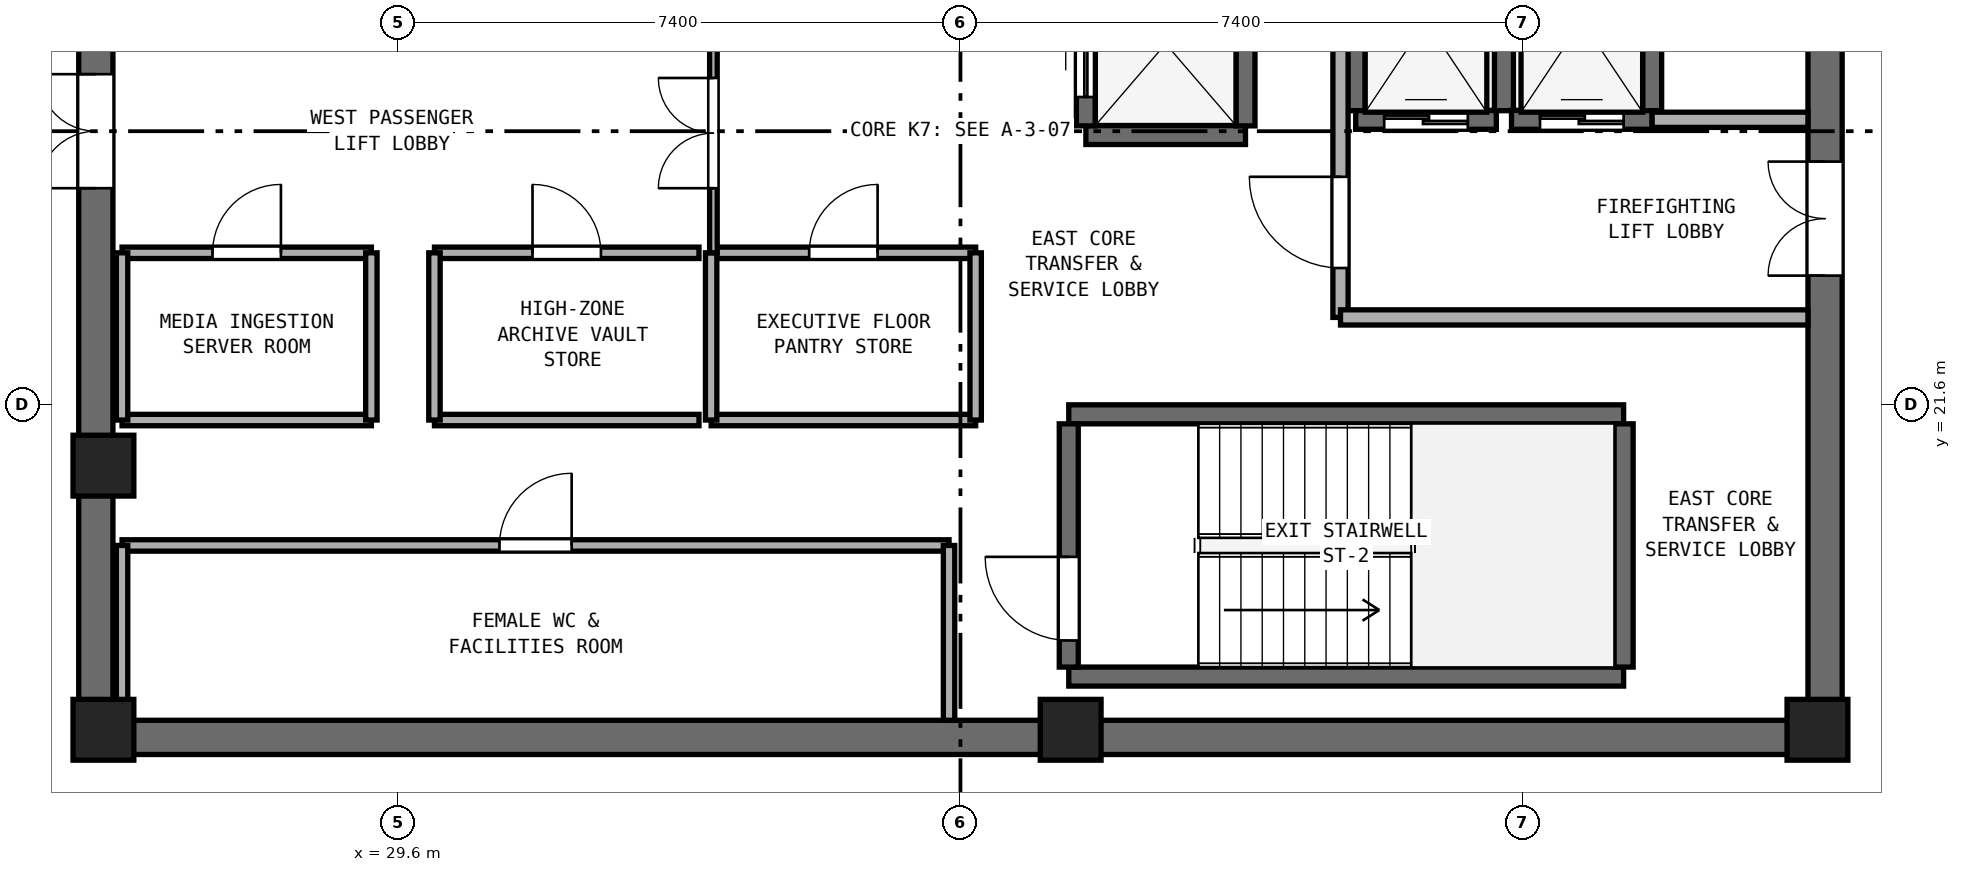
"""IFC4 building model, lengths in metres.
Left out: names, types, materials, properties, quantities, classifications, styles, units other than length and angle.
Written with IfcOpenShell. Run it as: python <this file> out.ifc"""

import sys

from ifc_helpers import new_model, si_unit, direction, frame, frame_2d, origin, origin_2d, place, context, subcontext, project, spatial, rectangle, extrude, element, fill, save


model = new_model("IFC4")
c1 = context("Model", 3, precision=1e-05, world=origin(), true_north=direction((0.0, 1.0)))
c2 = subcontext(c1, "Body", "Model", "MODEL_VIEW")
j1 = project(units=[si_unit("LENGTHUNIT", "METRE"), si_unit("PLANEANGLEUNIT", "RADIAN")], contexts=[c1])
p1 = place(None, origin())
s1 = spatial("IfcSite", under=j1, at=p1, CompositionType="ELEMENT")
p2 = place(p1, origin())
s2 = spatial("IfcBuilding", under=s1, at=p2, CompositionType="ELEMENT")
p3 = place(p2, frame((0.0, 0.0, 244.0)))
s3 = spatial("IfcBuildingStorey", under=s2, at=p3, CompositionType="ELEMENT", Elevation=244.0)
p4 = place(p3, frame((25.4, 17.225, 0.0), z_axis=(0.0, 0.0, 1.0), x_axis=(1.0, 0.0, 0.0)))
e1 = element("IfcWall", 1, at=p4, inside=s3, PredefinedType="SHEAR", context=c2, shape_type="SweptSolid", body=[
    extrude(rectangle(XDim=23.2, YDim=0.45, at=frame_2d((11.6, 0.0))), origin(), (0.0, 0.0, 1.0), 3.51),
])
p5 = place(p3, frame((25.625, 17.45, 0.0), z_axis=(0.0, 0.0, 1.0), x_axis=(0.0, 1.0, 0.0)))
e2 = element("IfcWall", 2, at=p5, inside=s3, PredefinedType="SHEAR", context=c2, shape_type="SweptSolid", body=[
    extrude(rectangle(XDim=15.5, YDim=0.45, at=frame_2d((7.75, 0.0))), origin(), (0.0, 0.0, 1.0), 3.51),
])
p6 = place(p5, frame((7.0, 0.0, 0.0)))
e3 = element("IfcOpeningElement", 3, at=p6, cuts=e2, PredefinedType="OPENING", context=c2, shape_type="SweptSolid", body=[
    extrude(rectangle(XDim=1.5, YDim=2.15, at=frame_2d((0.75, 1.075))), frame((0.0, 0.235, 0.0), z_axis=(0.0, -1.0, 0.0), x_axis=(1.0, 0.0, 0.0)), (0.0, 0.0, 1.0), 0.47),
])
p7 = place(p3, frame((48.375, 17.45, 0.0), z_axis=(0.0, 0.0, 1.0), x_axis=(0.0, 1.0, 0.0)))
e4 = element("IfcWall", 4, at=p7, inside=s3, PredefinedType="SHEAR", context=c2, shape_type="SweptSolid", body=[
    extrude(rectangle(XDim=15.5, YDim=0.45, at=frame_2d((7.75, 0.0))), origin(), (0.0, 0.0, 1.0), 3.51),
])
p8 = place(p7, frame((5.85, 0.0, 0.0)))
e5 = element("IfcOpeningElement", 5, at=p8, cuts=e4, PredefinedType="OPENING", context=c2, shape_type="SweptSolid", body=[
    extrude(rectangle(XDim=1.5, YDim=2.15, at=frame_2d((0.75, 1.075))), frame((0.0, 0.235, 0.0), z_axis=(0.0, -1.0, 0.0), x_axis=(1.0, 0.0, 0.0)), (0.0, 0.0, 1.0), 0.47),
])
for number, where, z_axis, x_axis in (
    (6, (25.725, 17.325, 0.0), (0.0, 0.0, 1.0), (1.0, 0.0, 0.0)),
    (7, (38.45, 17.325, 0.0), (0.0, 0.0, 1.0), (1.0, 0.0, 0.0)),
    (8, (48.275, 17.325, 0.0), (0.0, 0.0, 1.0), (1.0, 0.0, 0.0)),
    (9, (25.725, 20.8, 0.0), (0.0, 0.0, 1.0), (1.0, 0.0, 0.0)),
):
    element("IfcColumn", number, at=place(p3, frame(where, z_axis=z_axis, x_axis=x_axis)), inside=s3, PredefinedType="PILASTER", context=c2, shape_type="SweptSolid", body=[
        extrude(rectangle(XDim=0.8, YDim=0.8, at=origin_2d()), origin(), (0.0, 0.0, 1.0), 3.8),
    ])
for number, where, z_axis, x_axis in (
    (10, (38.425, 18.025, 0.0), (0.0, 0.0, 1.0), (1.0, 0.0, 0.0)),
    (11, (38.425, 21.475, 0.0), (0.0, 0.0, 1.0), (1.0, 0.0, 0.0)),
):
    element("IfcWall", number, at=place(p3, frame(where, z_axis=z_axis, x_axis=x_axis)), inside=s3, PredefinedType="SHEAR", context=c2, shape_type="SweptSolid", body=[
        extrude(rectangle(XDim=7.3, YDim=0.25, at=frame_2d((3.65, 0.0))), origin(), (0.0, 0.0, 1.0), 3.51),
    ])
p9 = place(p3, frame((38.425, 18.15, 0.0), z_axis=(0.0, 0.0, 1.0), x_axis=(0.0, 1.0, 0.0)))
e12 = element("IfcWall", 12, at=p9, inside=s3, PredefinedType="SHEAR", context=c2, shape_type="SweptSolid", body=[
    extrude(rectangle(XDim=3.2, YDim=0.25, at=frame_2d((1.6, 0.0))), origin(), (0.0, 0.0, 1.0), 3.51),
])
p10 = place(p9, frame((0.35, 0.0, 0.0)))
e13 = element("IfcOpeningElement", 13, at=p10, cuts=e12, PredefinedType="OPENING", context=c2, shape_type="SweptSolid", body=[
    extrude(rectangle(XDim=1.1, YDim=2.15, at=frame_2d((0.55, 1.075))), frame((0.0, 0.135, 0.0), z_axis=(0.0, -1.0, 0.0), x_axis=(1.0, 0.0, 0.0)), (0.0, 0.0, 1.0), 0.27),
])
p11 = place(p3, frame((45.725, 18.15, 0.0), z_axis=(0.0, 0.0, 1.0), x_axis=(0.0, 1.0, 0.0)))
e14 = element("IfcWall", 14, at=p11, inside=s3, PredefinedType="SHEAR", context=c2, shape_type="SweptSolid", body=[
    extrude(rectangle(XDim=3.2, YDim=0.25, at=frame_2d((1.6, 0.0))), origin(), (0.0, 0.0, 1.0), 3.51),
])
p12 = place(p3, frame((42.2, 25.35, 0.0), z_axis=(0.0, 0.0, 1.0), x_axis=(1.0, 0.0, 0.0)))
e15 = element("IfcWall", 15, at=p12, inside=s3, PredefinedType="SHEAR", context=c2, shape_type="SweptSolid", body=[
    extrude(rectangle(XDim=1.85, YDim=0.25, at=frame_2d((0.925, 0.0))), origin(), (0.0, 0.0, 1.0), 3.51),
])
p13 = place(p12, frame((0.375, 0.0, 0.0)))
e16 = element("IfcOpeningElement", 16, at=p13, cuts=e15, PredefinedType="OPENING", context=c2, shape_type="SweptSolid", body=[
    extrude(rectangle(XDim=1.1, YDim=2.15, at=frame_2d((0.55, 1.075))), frame((0.0, 0.135, 0.0), z_axis=(0.0, -1.0, 0.0), x_axis=(1.0, 0.0, 0.0)), (0.0, 0.0, 1.0), 0.27),
])
for number, where, z_axis, x_axis in (
    (17, (42.2, 25.47, 0.0), (0.0, 0.0, 1.0), (0.0, 1.0, 0.0)),
    (18, (44.15, 25.47, 0.0), (0.0, 0.0, 1.0), (0.0, 1.0, 0.0)),
):
    element("IfcWall", number, at=place(p3, frame(where, z_axis=z_axis, x_axis=x_axis)), inside=s3, PredefinedType="SHEAR", context=c2, shape_type="SweptSolid", body=[
        extrude(rectangle(XDim=2.36, YDim=0.25, at=frame_2d((1.18, 0.0))), origin(), (0.0, 0.0, 1.0), 3.51),
    ])
p14 = place(p3, frame((44.25, 25.35, 0.0), z_axis=(0.0, 0.0, 1.0), x_axis=(1.0, 0.0, 0.0)))
e19 = element("IfcWall", 19, at=p14, inside=s3, PredefinedType="SHEAR", context=c2, shape_type="SweptSolid", body=[
    extrude(rectangle(XDim=1.85, YDim=0.25, at=frame_2d((0.925, 0.0))), origin(), (0.0, 0.0, 1.0), 3.51),
])
p15 = place(p14, frame((0.375, 0.0, 0.0)))
e20 = element("IfcOpeningElement", 20, at=p15, cuts=e19, PredefinedType="OPENING", context=c2, shape_type="SweptSolid", body=[
    extrude(rectangle(XDim=1.1, YDim=2.15, at=frame_2d((0.55, 1.075))), frame((0.0, 0.135, 0.0), z_axis=(0.0, -1.0, 0.0), x_axis=(1.0, 0.0, 0.0)), (0.0, 0.0, 1.0), 0.27),
])
p16 = place(p3, frame((46.1, 25.47, 0.0), z_axis=(0.0, 0.0, 1.0), x_axis=(0.0, 1.0, 0.0)))
e21 = element("IfcWall", 21, at=p16, inside=s3, PredefinedType="SHEAR", context=c2, shape_type="SweptSolid", body=[
    extrude(rectangle(XDim=2.36, YDim=0.25, at=frame_2d((1.18, 0.0))), origin(), (0.0, 0.0, 1.0), 3.51),
])
p17 = place(p3, frame((38.65, 25.15, 0.0), z_axis=(0.0, 0.0, 1.0), x_axis=(1.0, 0.0, 0.0)))
e22 = element("IfcWall", 22, at=p17, inside=s3, PredefinedType="SHEAR", context=c2, shape_type="SweptSolid", body=[
    extrude(rectangle(XDim=2.1, YDim=0.25, at=frame_2d((1.05, 0.0))), origin(), (0.0, 0.0, 1.0), 3.51),
])
p18 = place(p3, frame((38.65, 25.27, 0.0), z_axis=(0.0, 0.0, 1.0), x_axis=(0.0, 1.0, 0.0)))
e23 = element("IfcWall", 23, at=p18, inside=s3, PredefinedType="SHEAR", context=c2, shape_type="SweptSolid", body=[
    extrude(rectangle(XDim=2.16, YDim=0.25, at=frame_2d((1.08, 0.0))), origin(), (0.0, 0.0, 1.0), 3.51),
])
p19 = place(p18, frame((0.38, 0.0, 0.0)))
e24 = element("IfcOpeningElement", 24, at=p19, cuts=e23, PredefinedType="OPENING", context=c2, shape_type="SweptSolid", body=[
    extrude(rectangle(XDim=1.4, YDim=2.2, at=frame_2d((0.7, 1.1))), frame((0.0, 0.135, 0.0), z_axis=(0.0, -1.0, 0.0), x_axis=(1.0, 0.0, 0.0)), (0.0, 0.0, 1.0), 0.27),
])
p20 = place(p3, frame((40.75, 25.27, 0.0), z_axis=(0.0, 0.0, 1.0), x_axis=(0.0, 1.0, 0.0)))
e25 = element("IfcWall", 25, at=p20, inside=s3, PredefinedType="SHEAR", context=c2, shape_type="SweptSolid", body=[
    extrude(rectangle(XDim=2.16, YDim=0.25, at=frame_2d((1.08, 0.0))), origin(), (0.0, 0.0, 1.0), 3.51),
])
p21 = place(p3, frame((42.0, 22.75, 0.0), z_axis=(0.0, 0.0, 1.0), x_axis=(0.0, 1.0, 0.0)))
e26 = element("IfcWall", 26, at=p21, inside=s3, PredefinedType="SOLIDWALL", context=c2, shape_type="SweptSolid", body=[
    extrude(rectangle(XDim=6.05, YDim=0.2, at=frame_2d((3.025, 0.0))), origin(), (0.0, 0.0, 1.0), 3.51),
])
p22 = place(p21, frame((0.65, 0.0, 0.0)))
e27 = element("IfcOpeningElement", 27, at=p22, cuts=e26, PredefinedType="OPENING", context=c2, shape_type="SweptSolid", body=[
    extrude(rectangle(XDim=1.2, YDim=2.15, at=frame_2d((0.6, 1.075))), frame((0.0, 0.11, 0.0), z_axis=(0.0, -1.0, 0.0), x_axis=(1.0, 0.0, 0.0)), (0.0, 0.0, 1.0), 0.22),
])
p23 = place(p3, frame((42.0, 22.75, 0.0), z_axis=(0.0, 0.0, 1.0), x_axis=(1.0, 0.0, 0.0)))
e28 = element("IfcWall", 28, at=p23, inside=s3, PredefinedType="SOLIDWALL", context=c2, shape_type="SweptSolid", body=[
    extrude(rectangle(XDim=6.15, YDim=0.2, at=frame_2d((3.075, 0.0))), origin(), (0.0, 0.0, 1.0), 3.51),
])
p24 = place(p3, frame((46.1, 25.35, 0.0), z_axis=(0.0, 0.0, 1.0), x_axis=(1.0, 0.0, 0.0)))
e29 = element("IfcWall", 29, at=p24, inside=s3, PredefinedType="SOLIDWALL", context=c2, shape_type="SweptSolid", body=[
    extrude(rectangle(XDim=2.05, YDim=0.2, at=frame_2d((1.025, 0.0))), origin(), (0.0, 0.0, 1.0), 3.51),
])
p25 = place(p3, frame((25.97, 19.75, 0.0), z_axis=(0.0, 0.0, 1.0), x_axis=(1.0, 0.0, 0.0)))
e30 = element("IfcWall", 30, at=p25, inside=s3, PredefinedType="PARTITIONING", context=c2, shape_type="SweptSolid", body=[
    extrude(rectangle(XDim=10.88, YDim=0.15, at=frame_2d((5.44, 0.0))), origin(), (0.0, 0.0, 1.0), 3.51),
])
p26 = place(p25, frame((4.965, 0.0, 0.0)))
e31 = element("IfcOpeningElement", 31, at=p26, cuts=e30, PredefinedType="OPENING", context=c2, shape_type="SweptSolid", body=[
    extrude(rectangle(XDim=0.95, YDim=2.1, at=frame_2d((0.475, 1.05))), frame((0.0, 0.085, 0.0), z_axis=(0.0, -1.0, 0.0), x_axis=(1.0, 0.0, 0.0)), (0.0, 0.0, 1.0), 0.17),
])
p27 = place(p3, frame((25.97, 17.45, 0.0), z_axis=(0.0, 0.0, 1.0), x_axis=(0.0, 1.0, 0.0)))
e32 = element("IfcWall", 32, at=p27, inside=s3, PredefinedType="PARTITIONING", context=c2, shape_type="SweptSolid", body=[
    extrude(rectangle(XDim=2.3, YDim=0.15, at=frame_2d((1.15, 0.0))), origin(), (0.0, 0.0, 1.0), 2.61),
])
p28 = place(p3, frame((36.85, 17.45, 0.0), z_axis=(0.0, 0.0, 1.0), x_axis=(0.0, 1.0, 0.0)))
e33 = element("IfcWall", 33, at=p28, inside=s3, PredefinedType="PARTITIONING", context=c2, shape_type="SweptSolid", body=[
    extrude(rectangle(XDim=2.3, YDim=0.15, at=frame_2d((1.15, 0.0))), origin(), (0.0, 0.0, 1.0), 3.51),
])
p29 = place(p3, frame((25.97, 21.4, 0.0), z_axis=(0.0, 0.0, 1.0), x_axis=(1.0, 0.0, 0.0)))
e34 = element("IfcWall", 34, at=p29, inside=s3, PredefinedType="PARTITIONING", context=c2, shape_type="SweptSolid", body=[
    extrude(rectangle(XDim=3.28, YDim=0.15, at=frame_2d((1.64, 0.0))), origin(), (0.0, 0.0, 1.0), 3.51),
])
p30 = place(p3, frame((25.97, 23.6, 0.0), z_axis=(0.0, 0.0, 1.0), x_axis=(1.0, 0.0, 0.0)))
e35 = element("IfcWall", 35, at=p30, inside=s3, PredefinedType="PARTITIONING", context=c2, shape_type="SweptSolid", body=[
    extrude(rectangle(XDim=3.28, YDim=0.15, at=frame_2d((1.64, 0.0))), origin(), (0.0, 0.0, 1.0), 3.51),
])
p31 = place(p30, frame((1.19, 0.0, 0.0)))
e36 = element("IfcOpeningElement", 36, at=p31, cuts=e35, PredefinedType="OPENING", context=c2, shape_type="SweptSolid", body=[
    extrude(rectangle(XDim=0.9, YDim=2.1, at=frame_2d((0.45, 1.05))), frame((0.0, 0.085, 0.0), z_axis=(0.0, -1.0, 0.0), x_axis=(1.0, 0.0, 0.0)), (0.0, 0.0, 1.0), 0.17),
])
p32 = place(p3, frame((25.97, 21.4, 0.0), z_axis=(0.0, 0.0, 1.0), x_axis=(0.0, 1.0, 0.0)))
e37 = element("IfcWall", 37, at=p32, inside=s3, PredefinedType="PARTITIONING", context=c2, shape_type="SweptSolid", body=[
    extrude(rectangle(XDim=2.2, YDim=0.15, at=frame_2d((1.1, 0.0))), origin(), (0.0, 0.0, 1.0), 2.61),
])
p33 = place(p3, frame((29.25, 21.4, 0.0), z_axis=(0.0, 0.0, 1.0), x_axis=(0.0, 1.0, 0.0)))
e38 = element("IfcWall", 38, at=p33, inside=s3, PredefinedType="PARTITIONING", context=c2, shape_type="SweptSolid", body=[
    extrude(rectangle(XDim=2.2, YDim=0.15, at=frame_2d((1.1, 0.0))), origin(), (0.0, 0.0, 1.0), 3.51),
])
p34 = place(p3, frame((30.08, 21.4, 0.0), z_axis=(0.0, 0.0, 1.0), x_axis=(1.0, 0.0, 0.0)))
e39 = element("IfcWall", 39, at=p34, inside=s3, PredefinedType="PARTITIONING", context=c2, shape_type="SweptSolid", body=[
    extrude(rectangle(XDim=3.48, YDim=0.15, at=frame_2d((1.74, 0.0))), origin(), (0.0, 0.0, 1.0), 3.51),
])
p35 = place(p3, frame((30.08, 23.6, 0.0), z_axis=(0.0, 0.0, 1.0), x_axis=(1.0, 0.0, 0.0)))
e40 = element("IfcWall", 40, at=p35, inside=s3, PredefinedType="PARTITIONING", context=c2, shape_type="SweptSolid", body=[
    extrude(rectangle(XDim=3.48, YDim=0.15, at=frame_2d((1.74, 0.0))), origin(), (0.0, 0.0, 1.0), 3.51),
])
p36 = place(p35, frame((1.29, 0.0, 0.0)))
e41 = element("IfcOpeningElement", 41, at=p36, cuts=e40, PredefinedType="OPENING", context=c2, shape_type="SweptSolid", body=[
    extrude(rectangle(XDim=0.9, YDim=2.1, at=frame_2d((0.45, 1.05))), frame((0.0, 0.085, 0.0), z_axis=(0.0, -1.0, 0.0), x_axis=(1.0, 0.0, 0.0)), (0.0, 0.0, 1.0), 0.17),
])
p37 = place(p3, frame((30.08, 21.4, 0.0), z_axis=(0.0, 0.0, 1.0), x_axis=(0.0, 1.0, 0.0)))
e42 = element("IfcWall", 42, at=p37, inside=s3, PredefinedType="PARTITIONING", context=c2, shape_type="SweptSolid", body=[
    extrude(rectangle(XDim=2.2, YDim=0.15, at=frame_2d((1.1, 0.0))), origin(), (0.0, 0.0, 1.0), 3.51),
])
p38 = place(p3, frame((33.72, 21.4, 0.0), z_axis=(0.0, 0.0, 1.0), x_axis=(1.0, 0.0, 0.0)))
e43 = element("IfcWall", 43, at=p38, inside=s3, PredefinedType="PARTITIONING", context=c2, shape_type="SweptSolid", body=[
    extrude(rectangle(XDim=3.48, YDim=0.15, at=frame_2d((1.74, 0.0))), origin(), (0.0, 0.0, 1.0), 3.51),
])
p39 = place(p3, frame((33.72, 23.6, 0.0), z_axis=(0.0, 0.0, 1.0), x_axis=(1.0, 0.0, 0.0)))
e44 = element("IfcWall", 44, at=p39, inside=s3, PredefinedType="PARTITIONING", context=c2, shape_type="SweptSolid", body=[
    extrude(rectangle(XDim=3.48, YDim=0.15, at=frame_2d((1.74, 0.0))), origin(), (0.0, 0.0, 1.0), 3.51),
])
p40 = place(p39, frame((1.29, 0.0, 0.0)))
e45 = element("IfcOpeningElement", 45, at=p40, cuts=e44, PredefinedType="OPENING", context=c2, shape_type="SweptSolid", body=[
    extrude(rectangle(XDim=0.9, YDim=2.1, at=frame_2d((0.45, 1.05))), frame((0.0, 0.085, 0.0), z_axis=(0.0, -1.0, 0.0), x_axis=(1.0, 0.0, 0.0)), (0.0, 0.0, 1.0), 0.17),
])
for number, where, z_axis, x_axis in (
    (46, (33.72, 21.4, 0.0), (0.0, 0.0, 1.0), (0.0, 1.0, 0.0)),
    (47, (37.2, 21.4, 0.0), (0.0, 0.0, 1.0), (0.0, 1.0, 0.0)),
):
    element("IfcWall", number, at=place(p3, frame(where, z_axis=z_axis, x_axis=x_axis)), inside=s3, PredefinedType="PARTITIONING", context=c2, shape_type="SweptSolid", body=[
        extrude(rectangle(XDim=2.2, YDim=0.15, at=frame_2d((1.1, 0.0))), origin(), (0.0, 0.0, 1.0), 3.51),
    ])
p41 = place(p3, frame((33.75, 23.6, 0.0), z_axis=(0.0, 0.0, 1.0), x_axis=(0.0, 1.0, 0.0)))
e48 = element("IfcWall", 48, at=p41, inside=s3, PredefinedType="PARTITIONING", context=c2, shape_type="SweptSolid", body=[
    extrude(rectangle(XDim=3.2, YDim=0.1, at=frame_2d((1.6, 0.0))), origin(), (0.0, 0.0, 1.0), 3.51),
])
p42 = place(p41, frame((0.85, 0.0, 0.0)))
e49 = element("IfcOpeningElement", 49, at=p42, cuts=e48, PredefinedType="OPENING", context=c2, shape_type="SweptSolid", body=[
    extrude(rectangle(XDim=1.45, YDim=2.12, at=frame_2d((0.725, 1.06))), frame((0.0, 0.06, 0.0), z_axis=(0.0, -1.0, 0.0), x_axis=(1.0, 0.0, 0.0)), (0.0, 0.0, 1.0), 0.12),
])
p43 = place(p10, origin())
e50 = element("IfcDoor", 50, at=p43, inside=s3, OperationType="SINGLE_SWING_RIGHT", PredefinedType="DOOR", context=c2, shape_type="SweptSolid", body=[
    extrude(rectangle(XDim=1.1, YDim=2.15, at=frame_2d((0.55, 1.075))), frame((0.0, 0.025, 0.0), z_axis=(0.0, -1.0, 0.0), x_axis=(1.0, 0.0, 0.0)), (0.0, 0.0, 1.0), 0.05),
])
fill(e13, e50)
p44 = place(p13, origin())
e51 = element("IfcDoor", 51, at=p44, inside=s3, OperationType="DOUBLE_DOOR_SLIDING", PredefinedType="DOOR", context=c2, shape_type="SweptSolid", body=[
    extrude(rectangle(XDim=1.1, YDim=2.15, at=frame_2d((0.55, 1.075))), frame((0.0, 0.025, 0.0), z_axis=(0.0, -1.0, 0.0), x_axis=(1.0, 0.0, 0.0)), (0.0, 0.0, 1.0), 0.05),
])
fill(e16, e51)
p45 = place(p15, origin())
e52 = element("IfcDoor", 52, at=p45, inside=s3, OperationType="DOUBLE_DOOR_SLIDING", PredefinedType="DOOR", context=c2, shape_type="SweptSolid", body=[
    extrude(rectangle(XDim=1.1, YDim=2.15, at=frame_2d((0.55, 1.075))), frame((0.0, 0.025, 0.0), z_axis=(0.0, -1.0, 0.0), x_axis=(1.0, 0.0, 0.0)), (0.0, 0.0, 1.0), 0.05),
])
fill(e20, e52)
p46 = place(p19, origin())
e53 = element("IfcDoor", 53, at=p46, inside=s3, OperationType="DOUBLE_DOOR_SLIDING", PredefinedType="DOOR", context=c2, shape_type="SweptSolid", body=[
    extrude(rectangle(XDim=1.4, YDim=2.2, at=frame_2d((0.7, 1.1))), frame((0.0, 0.025, 0.0), z_axis=(0.0, -1.0, 0.0), x_axis=(1.0, 0.0, 0.0)), (0.0, 0.0, 1.0), 0.05),
])
fill(e24, e53)
p47 = place(p22, origin())
e54 = element("IfcDoor", 54, at=p47, inside=s3, OperationType="SINGLE_SWING_RIGHT", PredefinedType="DOOR", context=c2, shape_type="SweptSolid", body=[
    extrude(rectangle(XDim=1.2, YDim=2.15, at=frame_2d((0.6, 1.075))), frame((0.0, 0.025, 0.0), z_axis=(0.0, -1.0, 0.0), x_axis=(1.0, 0.0, 0.0)), (0.0, 0.0, 1.0), 0.05),
])
fill(e27, e54)
p48 = place(p6, origin())
e55 = element("IfcDoor", 55, at=p48, inside=s3, OperationType="DOUBLE_DOOR_SINGLE_SWING", PredefinedType="DOOR", context=c2, shape_type="SweptSolid", body=[
    extrude(rectangle(XDim=1.5, YDim=2.15, at=frame_2d((0.75, 1.075))), frame((0.0, 0.025, 0.0), z_axis=(0.0, -1.0, 0.0), x_axis=(1.0, 0.0, 0.0)), (0.0, 0.0, 1.0), 0.05),
])
fill(e3, e55)
p49 = place(p8, origin())
e56 = element("IfcDoor", 56, at=p49, inside=s3, OperationType="DOUBLE_DOOR_SINGLE_SWING", PredefinedType="DOOR", context=c2, shape_type="SweptSolid", body=[
    extrude(rectangle(XDim=1.5, YDim=2.15, at=frame_2d((0.75, 1.075))), frame((0.0, 0.025, 0.0), z_axis=(0.0, -1.0, 0.0), x_axis=(1.0, 0.0, 0.0)), (0.0, 0.0, 1.0), 0.05),
])
fill(e5, e56)
p50 = place(p26, origin())
e57 = element("IfcDoor", 57, at=p50, inside=s3, OperationType="SINGLE_SWING_RIGHT", PredefinedType="DOOR", context=c2, shape_type="SweptSolid", body=[
    extrude(rectangle(XDim=0.95, YDim=2.1, at=frame_2d((0.475, 1.05))), frame((0.0, 0.025, 0.0), z_axis=(0.0, -1.0, 0.0), x_axis=(1.0, 0.0, 0.0)), (0.0, 0.0, 1.0), 0.05),
])
fill(e31, e57)
p51 = place(p31, origin())
e58 = element("IfcDoor", 58, at=p51, inside=s3, OperationType="SINGLE_SWING_RIGHT", PredefinedType="DOOR", context=c2, shape_type="SweptSolid", body=[
    extrude(rectangle(XDim=0.9, YDim=2.1, at=frame_2d((0.45, 1.05))), frame((0.0, 0.025, 0.0), z_axis=(0.0, -1.0, 0.0), x_axis=(1.0, 0.0, 0.0)), (0.0, 0.0, 1.0), 0.05),
])
fill(e36, e58)
p52 = place(p36, origin())
e59 = element("IfcDoor", 59, at=p52, inside=s3, OperationType="SINGLE_SWING_LEFT", PredefinedType="DOOR", context=c2, shape_type="SweptSolid", body=[
    extrude(rectangle(XDim=0.9, YDim=2.1, at=frame_2d((0.45, 1.05))), frame((0.0, 0.025, 0.0), z_axis=(0.0, -1.0, 0.0), x_axis=(1.0, 0.0, 0.0)), (0.0, 0.0, 1.0), 0.05),
])
fill(e41, e59)
p53 = place(p40, origin())
e60 = element("IfcDoor", 60, at=p53, inside=s3, OperationType="SINGLE_SWING_RIGHT", PredefinedType="DOOR", context=c2, shape_type="SweptSolid", body=[
    extrude(rectangle(XDim=0.9, YDim=2.1, at=frame_2d((0.45, 1.05))), frame((0.0, 0.025, 0.0), z_axis=(0.0, -1.0, 0.0), x_axis=(1.0, 0.0, 0.0)), (0.0, 0.0, 1.0), 0.05),
])
fill(e45, e60)
p54 = place(p42, origin())
e61 = element("IfcDoor", 61, at=p54, inside=s3, OperationType="DOUBLE_DOOR_SINGLE_SWING", PredefinedType="DOOR", context=c2, shape_type="SweptSolid", body=[
    extrude(rectangle(XDim=1.45, YDim=2.12, at=frame_2d((0.725, 1.06))), frame((0.0, 0.025, 0.0), z_axis=(0.0, -1.0, 0.0), x_axis=(1.0, 0.0, 0.0)), (0.0, 0.0, 1.0), 0.05),
])
fill(e49, e61)
save(model, sys.argv[1])
